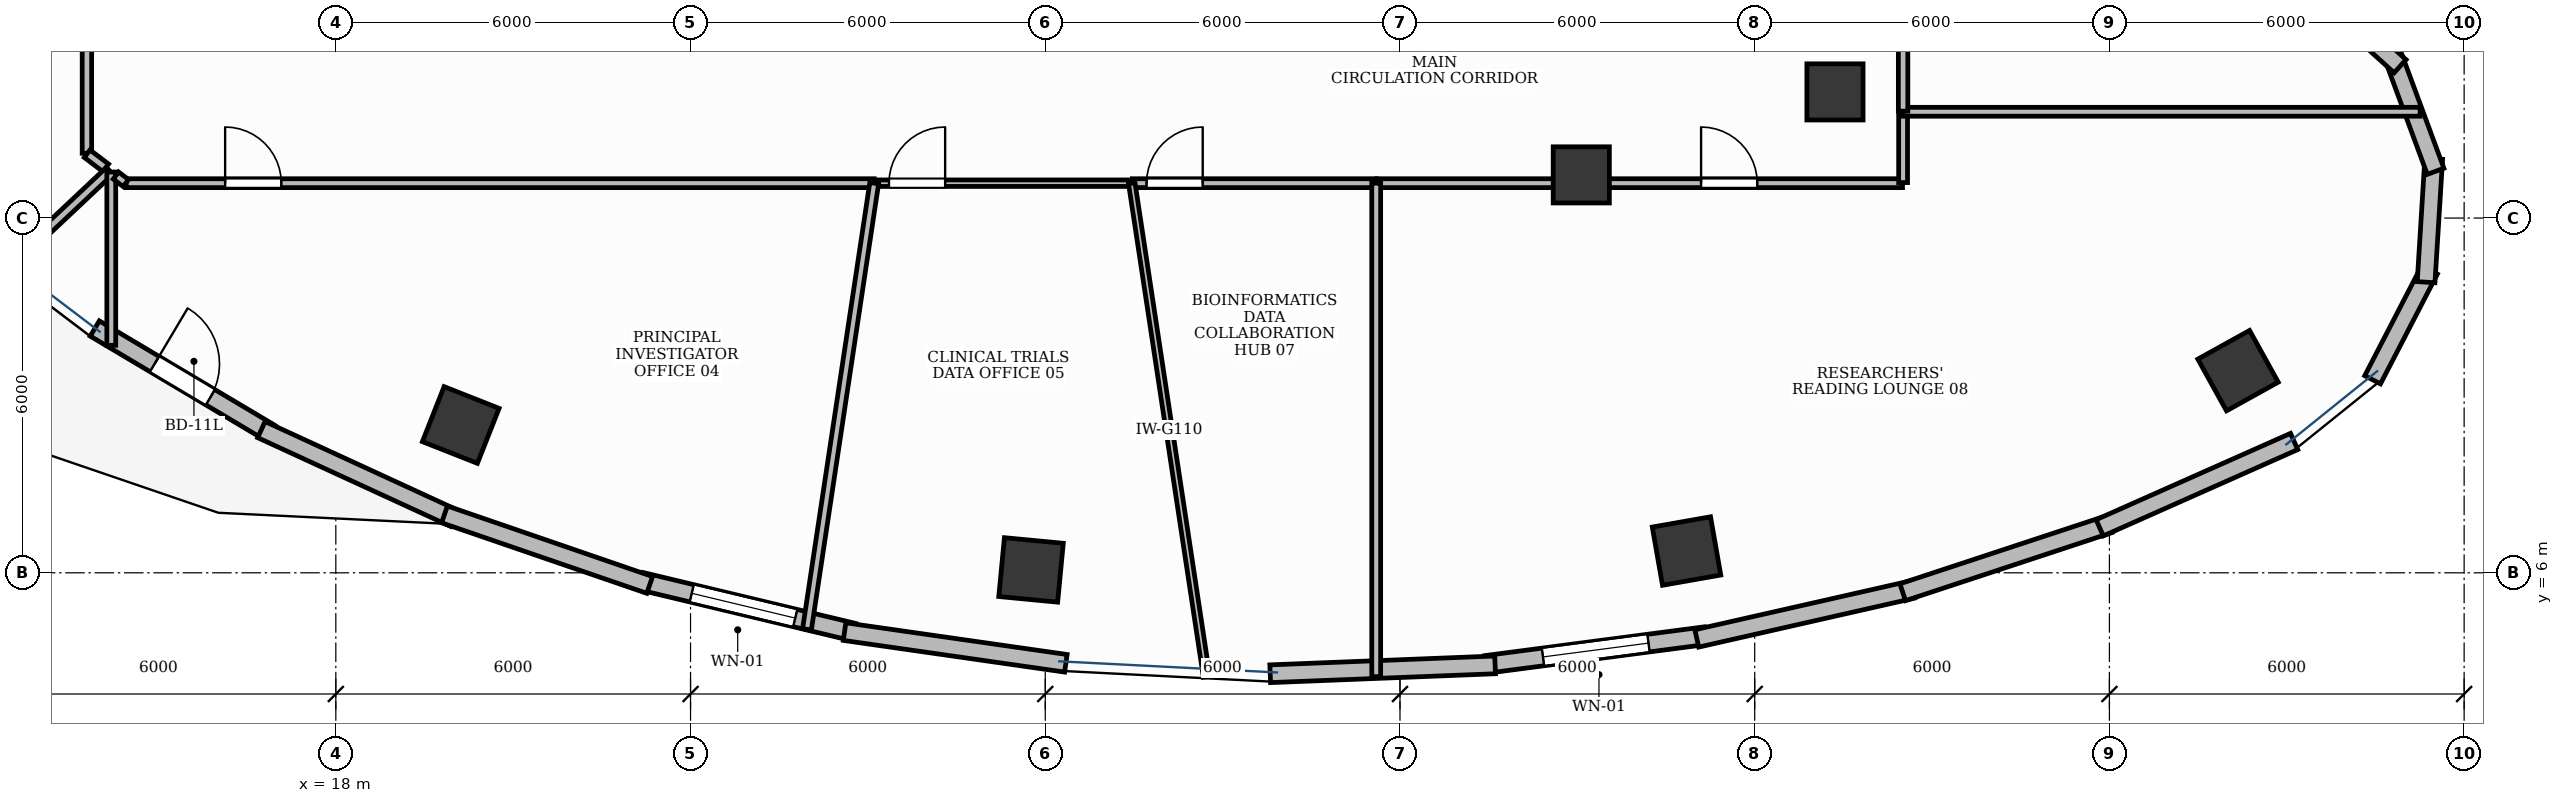
"""IFC4 building model, lengths in metres.
Left out: names, types, materials, properties, quantities, classifications, styles, units other than length and angle.
Written with IfcOpenShell. Run it as: python <this file> out.ifc"""

import sys

from ifc_helpers import new_model, si_unit, direction, frame, frame_2d, origin, origin_2d, place, context, subcontext, project, spatial, rectangle, extrude, element, fill, save


model = new_model("IFC4")
c1 = context("Model", 3, precision=1e-05, world=origin(), true_north=direction((0.0, 1.0)))
c2 = subcontext(c1, "Body", "Model", "MODEL_VIEW")
j1 = project(units=[si_unit("LENGTHUNIT", "METRE"), si_unit("PLANEANGLEUNIT", "RADIAN")], contexts=[c1])
p1 = place(None, origin())
s1 = spatial("IfcSite", under=j1, at=p1, CompositionType="ELEMENT")
p2 = place(p1, origin())
s2 = spatial("IfcBuilding", under=s1, at=p2, CompositionType="ELEMENT")
p3 = place(p2, frame((0.0, 0.0, 239.4)))
s3 = spatial("IfcBuildingStorey", under=s2, at=p3, CompositionType="ELEMENT", Elevation=239.4)
for number, where, z_axis, x_axis in (
    (1, (20.113, 8.5, -0.0), (0.0, 0.0, 1.0), (-0.93, 0.367, 0.0)),
    (2, (29.759, 6.049, -0.0), (0.0, 0.0, 1.0), (-0.995, 0.095, 0.0)),
    (3, (40.847, 6.368, -0.0), (0.0, 0.0, 1.0), (0.985, 0.173, 0.0)),
):
    element("IfcColumn", number, at=place(p3, frame(where, z_axis=z_axis, x_axis=x_axis)), inside=s3, PredefinedType="COLUMN", context=c2, shape_type="SweptSolid", body=[
        extrude(rectangle(XDim=1.0, YDim=1.0, at=origin_2d()), origin(), (0.0, 0.0, 1.0), 3.901),
    ])
p4 = place(p3, frame((39.067, 12.73, -0.0), z_axis=(0.0, 0.0, 1.0), x_axis=(1.0, 0.0, 0.0)))
e4 = element("IfcColumn", 4, at=p4, inside=s3, PredefinedType="COLUMN", context=c2, shape_type="SweptSolid", body=[
    extrude(rectangle(XDim=0.95, YDim=0.95, at=origin_2d()), origin(), (0.0, 0.0, 1.0), 3.901),
])
p5 = place(p3, frame((50.176, 9.419, -0.0), z_axis=(0.0, 0.0, 1.0), x_axis=(0.874535078577, 0.484962262797, 0.0)))
e5 = element("IfcColumn", 5, at=p5, inside=s3, PredefinedType="COLUMN", context=c2, shape_type="SweptSolid", body=[
    extrude(rectangle(XDim=1.0, YDim=1.0, at=origin_2d()), origin(), (0.0, 0.0, 1.0), 3.901),
])
p6 = place(p3, frame((43.358, 14.134, -0.0), z_axis=(0.0, 0.0, 1.0), x_axis=(1.0, 0.0, 0.0)))
e6 = element("IfcColumn", 6, at=p6, inside=s3, PredefinedType="COLUMN", context=c2, shape_type="SweptSolid", body=[
    extrude(rectangle(XDim=0.95, YDim=0.95, at=origin_2d()), origin(), (0.0, 0.0, 1.0), 3.901),
])
p7 = place(p3, frame((13.923, 10.132, 0.0), z_axis=(0.0, 0.0, 1.0), x_axis=(0.859459434124, -0.511203952543, 0.0)))
e7 = element("IfcWall", 7, at=p7, inside=s3, PredefinedType="STANDARD", context=c2, shape_type="SweptSolid", body=[
    extrude(rectangle(XDim=3.45, YDim=0.3, at=frame_2d((1.725, 0.0))), origin(), (0.0, 0.0, 1.0), 3.9),
])
p8 = place(p7, frame((1.175, 0.0, 0.0)))
e8 = element("IfcOpeningElement", 8, at=p8, cuts=e7, PredefinedType="OPENING", context=c2, shape_type="SweptSolid", body=[
    extrude(rectangle(XDim=1.1, YDim=2.15, at=frame_2d((0.55, 1.075))), frame((0.0, 0.165, 0.0), z_axis=(0.0, -1.0, 0.0), x_axis=(1.0, 0.0, 0.0)), (0.0, 0.0, 1.0), 0.33),
])
p9 = place(p3, frame((23.167, 5.858, 0.0), z_axis=(0.0, 0.0, 1.0), x_axis=(0.972474188183, -0.233010629193, 0.0)))
e9 = element("IfcWall", 9, at=p9, inside=s3, PredefinedType="STANDARD", context=c2, shape_type="SweptSolid", body=[
    extrude(rectangle(XDim=3.696, YDim=0.3, at=frame_2d((1.848, 0.0))), origin(), (0.0, 0.0, 1.0), 3.9),
])
p10 = place(p9, frame((0.878, 0.0, 0.9)))
e10 = element("IfcOpeningElement", 10, at=p10, cuts=e9, PredefinedType="OPENING", context=c2, shape_type="SweptSolid", body=[
    extrude(rectangle(XDim=1.8, YDim=2.1, at=frame_2d((0.9, 1.05))), frame((0.0, 0.165, 0.0), z_axis=(0.0, -1.0, 0.0), x_axis=(1.0, 0.0, 0.0)), (0.0, 0.0, 1.0), 0.33),
])
p11 = place(p3, frame((37.454, 4.45, 0.0), z_axis=(0.0, 0.0, 1.0), x_axis=(0.991509668365, 0.130032986352, 0.0)))
e11 = element("IfcWall", 11, at=p11, inside=s3, PredefinedType="STANDARD", context=c2, shape_type="SweptSolid", body=[
    extrude(rectangle(XDim=3.746, YDim=0.3, at=frame_2d((1.873, 0.0))), origin(), (0.0, 0.0, 1.0), 3.9),
])
p12 = place(p11, frame((0.973, 0.0, 0.9)))
e12 = element("IfcOpeningElement", 12, at=p12, cuts=e11, PredefinedType="OPENING", context=c2, shape_type="SweptSolid", body=[
    extrude(rectangle(XDim=1.8, YDim=2.1, at=frame_2d((0.9, 1.05))), frame((0.0, 0.165, 0.0), z_axis=(0.0, -1.0, 0.0), x_axis=(1.0, 0.0, 0.0)), (0.0, 0.0, 1.0), 0.33),
])
p13 = place(p3, frame((16.741, 8.422, 0.0), z_axis=(0.0, 0.0, 1.0), x_axis=(0.908506474671, -0.417870776055, 0.0)))
e13 = element("IfcWall", 13, at=p13, inside=s3, PredefinedType="STANDARD", context=c2, shape_type="SweptSolid", body=[
    extrude(rectangle(XDim=3.587, YDim=0.3, at=frame_2d((1.793, 0.0))), origin(), (0.0, 0.0, 1.0), 3.9),
])
p14 = place(p3, frame((19.838, 6.988, 0.0), z_axis=(0.0, 0.0, 1.0), x_axis=(0.945722383555, -0.32497565023, 0.0)))
e14 = element("IfcWall", 14, at=p14, inside=s3, PredefinedType="STANDARD", context=c2, shape_type="SweptSolid", body=[
    extrude(rectangle(XDim=3.67, YDim=0.3, at=frame_2d((1.835, 0.0))), origin(), (0.0, 0.0, 1.0), 3.9),
])
p15 = place(p3, frame((26.605, 5.005, 0.0), z_axis=(0.0, 0.0, 1.0), x_axis=(0.989897776303, -0.141782906128, 0.0)))
e15 = element("IfcWall", 15, at=p15, inside=s3, PredefinedType="STANDARD", context=c2, shape_type="SweptSolid", body=[
    extrude(rectangle(XDim=3.781, YDim=0.3, at=frame_2d((1.891, 0.0))), origin(), (0.0, 0.0, 1.0), 3.9),
])
p16 = place(p3, frame((33.805, 4.292, 0.0), z_axis=(0.0, 0.0, 1.0), x_axis=(0.999221923177, 0.039440439173, 0.0)))
e16 = element("IfcWall", 16, at=p16, inside=s3, PredefinedType="STANDARD", context=c2, shape_type="SweptSolid", body=[
    extrude(rectangle(XDim=3.807, YDim=0.3, at=frame_2d((1.903, 0.0))), origin(), (0.0, 0.0, 1.0), 3.9),
])
p17 = place(p3, frame((41.021, 4.89, 0.0), z_axis=(0.0, 0.0, 1.0), x_axis=(0.975241674184, 0.221141757557, 0.0)))
e17 = element("IfcWall", 17, at=p17, inside=s3, PredefinedType="STANDARD", context=c2, shape_type="SweptSolid", body=[
    extrude(rectangle(XDim=3.743, YDim=0.3, at=frame_2d((1.871, 0.0))), origin(), (0.0, 0.0, 1.0), 3.9),
])
p18 = place(p3, frame((44.504, 5.671, 0.0), z_axis=(0.0, 0.0, 1.0), x_axis=(0.94972655205, 0.313080622734, 0.0)))
e18 = element("IfcWall", 18, at=p18, inside=s3, PredefinedType="STANDARD", context=c2, shape_type="SweptSolid", body=[
    extrude(rectangle(XDim=3.679, YDim=0.3, at=frame_2d((1.84, 0.0))), origin(), (0.0, 0.0, 1.0), 3.9),
])
p19 = place(p3, frame((47.836, 6.761, 0.0), z_axis=(0.0, 0.0, 1.0), x_axis=(0.913940198441, 0.405848880341, 0.0)))
e19 = element("IfcWall", 19, at=p19, inside=s3, PredefinedType="STANDARD", context=c2, shape_type="SweptSolid", body=[
    extrude(rectangle(XDim=3.598, YDim=0.3, at=frame_2d((1.799, 0.0))), origin(), (0.0, 0.0, 1.0), 3.9),
])
p20 = place(p3, frame((52.452, 9.265, 0.0), z_axis=(0.0, 0.0, 1.0), x_axis=(0.459683297138, 0.888082916361, 0.0)))
e20 = element("IfcWall", 20, at=p20, inside=s3, PredefinedType="STANDARD", context=c2, shape_type="SweptSolid", body=[
    extrude(rectangle(XDim=2.092, YDim=0.3, at=frame_2d((1.046, 0.0))), origin(), (0.0, 0.0, 1.0), 3.9),
])
for number, where, z_axis, x_axis in (
    (21, (53.356, 10.915, 0.0), (0.0, 0.0, 1.0), (0.062, 0.998, 0.0)),
    (22, (53.517, 12.791, 0.0), (0.0, 0.0, 1.0), (-0.346, 0.938, 0.0)),
):
    element("IfcWall", number, at=place(p3, frame(where, z_axis=z_axis, x_axis=x_axis)), inside=s3, PredefinedType="STANDARD", context=c2, shape_type="SweptSolid", body=[
        extrude(rectangle(XDim=2.091, YDim=0.3, at=frame_2d((1.046, 0.0))), origin(), (0.0, 0.0, 1.0), 3.9),
    ])
p21 = place(p3, frame((52.917, 14.569, 0.0), z_axis=(0.0, 0.0, 1.0), x_axis=(-0.742037796493, 0.670358045059, 0.0)))
e23 = element("IfcWall", 23, at=p21, inside=s3, PredefinedType="STANDARD", context=c2, shape_type="SweptSolid", body=[
    extrude(rectangle(XDim=3.685, YDim=0.3, at=frame_2d((1.843, 0.0))), origin(), (0.0, 0.0, 1.0), 3.9),
])
p22 = place(p3, frame((13.79, 23.884, 0.0), z_axis=(0.0, 0.0, 1.0), x_axis=(0.0, -1.0, 0.0)))
e24 = element("IfcWall", 24, at=p22, inside=s3, PredefinedType="PARTITIONING", context=c2, shape_type="SweptSolid", body=[
    extrude(rectangle(XDim=10.787, YDim=0.16, at=frame_2d((5.394, 0.0))), origin(), (0.0, 0.0, 1.0), 2.22),
])
p23 = place(p22, frame((0.24, 0.0, 0.0)))
e25 = element("IfcOpeningElement", 25, at=p23, cuts=e24, PredefinedType="OPENING", context=c2, shape_type="SweptSolid", body=[
    extrude(rectangle(XDim=0.95, YDim=2.15, at=frame_2d((0.475, 1.075))), frame((0.0, 0.095, 0.0), z_axis=(0.0, -1.0, 0.0), x_axis=(1.0, 0.0, 0.0)), (0.0, 0.0, 1.0), 0.19),
])
p24 = place(p3, frame((14.454, 12.59, 0.0), z_axis=(0.0, 0.0, 1.0), x_axis=(1.0, 0.0, 0.0)))
e26 = element("IfcWall", 26, at=p24, inside=s3, PredefinedType="PARTITIONING", context=c2, shape_type="SweptSolid", body=[
    extrude(rectangle(XDim=12.652, YDim=0.15, at=frame_2d((6.326, 0.0))), origin(), (0.0, 0.0, 1.0), 2.22),
])
p25 = place(p24, frame((1.673, 0.0, 0.0)))
e27 = element("IfcOpeningElement", 27, at=p25, cuts=e26, PredefinedType="OPENING", context=c2, shape_type="SweptSolid", body=[
    extrude(rectangle(XDim=0.95, YDim=2.15, at=frame_2d((0.475, 1.075))), frame((0.0, 0.09, 0.0), z_axis=(0.0, -1.0, 0.0), x_axis=(1.0, 0.0, 0.0)), (0.0, 0.0, 1.0), 0.18),
])
p26 = place(p3, frame((27.117, 12.59, 0.0), z_axis=(0.0, 0.0, 1.0), x_axis=(1.0, 0.0, 0.0)))
e28 = element("IfcWall", 28, at=p26, inside=s3, PredefinedType="MOVABLE", context=c2, shape_type="SweptSolid", body=[
    extrude(rectangle(XDim=4.347, YDim=0.11, at=frame_2d((2.173, 0.0))), origin(), (0.0, 0.0, 1.0), 2.22),
])
p27 = place(p26, frame((0.24, 0.0, 0.0)))
e29 = element("IfcOpeningElement", 29, at=p27, cuts=e28, PredefinedType="OPENING", context=c2, shape_type="SweptSolid", body=[
    extrude(rectangle(XDim=0.95, YDim=2.15, at=frame_2d((0.475, 1.075))), frame((0.0, 0.07, 0.0), z_axis=(0.0, -1.0, 0.0), x_axis=(1.0, 0.0, 0.0)), (0.0, 0.0, 1.0), 0.14),
])
p28 = place(p3, frame((31.473, 12.59, 0.0), z_axis=(0.0, 0.0, 1.0), x_axis=(1.0, 0.0, 0.0)))
e30 = element("IfcWall", 30, at=p28, inside=s3, PredefinedType="PARTITIONING", context=c2, shape_type="SweptSolid", body=[
    extrude(rectangle(XDim=4.125, YDim=0.15, at=frame_2d((2.062, 0.0))), origin(), (0.0, 0.0, 1.0), 2.22),
])
p29 = place(p28, frame((0.24, 0.0, 0.0)))
e31 = element("IfcOpeningElement", 31, at=p29, cuts=e30, PredefinedType="OPENING", context=c2, shape_type="SweptSolid", body=[
    extrude(rectangle(XDim=0.95, YDim=2.15, at=frame_2d((0.475, 1.075))), frame((0.0, 0.09, 0.0), z_axis=(0.0, -1.0, 0.0), x_axis=(1.0, 0.0, 0.0)), (0.0, 0.0, 1.0), 0.18),
])
p30 = place(p3, frame((35.608, 12.59, 0.0), z_axis=(0.0, 0.0, 1.0), x_axis=(1.0, 0.0, 0.0)))
e32 = element("IfcWall", 32, at=p30, inside=s3, PredefinedType="PARTITIONING", context=c2, shape_type="SweptSolid", body=[
    extrude(rectangle(XDim=8.892, YDim=0.15, at=frame_2d((4.446, 0.0))), origin(), (0.0, 0.0, 1.0), 2.22),
])
p31 = place(p30, frame((5.485, 0.0, 0.0)))
e33 = element("IfcOpeningElement", 33, at=p31, cuts=e32, PredefinedType="OPENING", context=c2, shape_type="SweptSolid", body=[
    extrude(rectangle(XDim=0.95, YDim=2.15, at=frame_2d((0.475, 1.075))), frame((0.0, 0.09, 0.0), z_axis=(0.0, -1.0, 0.0), x_axis=(1.0, 0.0, 0.0)), (0.0, 0.0, 1.0), 0.18),
])
p32 = place(p3, frame((13.794, 13.088, 0.0), z_axis=(0.0, 0.0, 1.0), x_axis=(0.797092148154, -0.603857687995, 0.0)))
e34 = element("IfcWall", 34, at=p32, inside=s3, PredefinedType="PARTITIONING", context=c2, shape_type="SweptSolid", body=[
    extrude(rectangle(XDim=0.394, YDim=0.16, at=frame_2d((0.197, 0.0))), origin(), (0.0, 0.0, 1.0), 2.22),
])
p33 = place(p3, frame((14.175, 12.799, 0.0), z_axis=(0.0, 0.0, 1.0), x_axis=(-0.728528819482, -0.685015152521, 0.0)))
e35 = element("IfcWall", 35, at=p33, inside=s3, PredefinedType="PARTITIONING", context=c2, shape_type="SweptSolid", body=[
    extrude(rectangle(XDim=2.441, YDim=0.16, at=frame_2d((1.22, 0.0))), origin(), (0.0, 0.0, 1.0), 2.22),
])
p34 = place(p3, frame((14.202, 9.847, 0.0), z_axis=(0.0, 0.0, 1.0), x_axis=(0.0, 1.0, 0.0)))
e36 = element("IfcWall", 36, at=p34, inside=s3, PredefinedType="PARTITIONING", context=c2, shape_type="SweptSolid", body=[
    extrude(rectangle(XDim=2.931, YDim=0.15, at=frame_2d((1.466, 0.0))), origin(), (0.0, 0.0, 1.0), 2.22),
])
p35 = place(p3, frame((14.28, 12.72, 0.0), z_axis=(0.0, 0.0, 1.0), x_axis=(0.796940505815, -0.604057803683, 0.0)))
e37 = element("IfcWall", 37, at=p35, inside=s3, PredefinedType="PARTITIONING", context=c2, shape_type="SweptSolid", body=[
    extrude(rectangle(XDim=0.211, YDim=0.15, at=frame_2d((0.106, 0.0))), origin(), (0.0, 0.0, 1.0), 2.22),
])
p36 = place(p3, frame((27.107, 12.59, 0.0), z_axis=(0.0, 0.0, 1.0), x_axis=(-0.149013085528, -0.98883522406, 0.0)))
e38 = element("IfcWall", 38, at=p36, inside=s3, PredefinedType="PARTITIONING", context=c2, shape_type="SweptSolid", body=[
    extrude(rectangle(XDim=7.632, YDim=0.15, at=frame_2d((3.816, 0.0))), origin(), (0.0, 0.0, 1.0), 2.22),
])
p37 = place(p3, frame((31.463, 12.59, 0.0), z_axis=(0.0, 0.0, 1.0), x_axis=(0.149927844007, -0.988696941227, 0.0)))
e39 = element("IfcWall", 39, at=p37, inside=s3, PredefinedType="MOVABLE", context=c2, shape_type="SweptSolid", body=[
    extrude(rectangle(XDim=8.445, YDim=0.11, at=frame_2d((4.222, 0.0))), origin(), (0.0, 0.0, 1.0), 2.22),
])
p38 = place(p3, frame((35.598, 12.59, 0.0), z_axis=(0.0, 0.0, 1.0), x_axis=(0.0, -1.0, 0.0)))
e40 = element("IfcWall", 40, at=p38, inside=s3, PredefinedType="PARTITIONING", context=c2, shape_type="SweptSolid", body=[
    extrude(rectangle(XDim=8.347, YDim=0.15, at=frame_2d((4.173, 0.0))), origin(), (0.0, 0.0, 1.0), 2.22),
])
p39 = place(p3, frame((44.51, 12.6, 0.0), z_axis=(0.0, 0.0, 1.0), x_axis=(0.0, 1.0, 0.0)))
e41 = element("IfcWall", 41, at=p39, inside=s3, PredefinedType="PARTITIONING", context=c2, shape_type="SweptSolid", body=[
    extrude(rectangle(XDim=1.198, YDim=0.15, at=frame_2d((0.599, 0.0))), origin(), (0.0, 0.0, 1.0), 2.22),
])
p40 = place(p3, frame((44.51, 13.798, 0.0), z_axis=(0.0, 0.0, 1.0), x_axis=(1.0, 0.0, 0.0)))
e42 = element("IfcWall", 42, at=p40, inside=s3, PredefinedType="PARTITIONING", context=c2, shape_type="SweptSolid", body=[
    extrude(rectangle(XDim=8.745, YDim=0.15, at=frame_2d((4.373, 0.0))), origin(), (0.0, 0.0, 1.0), 2.22),
])
p41 = place(p3, frame((44.51, 13.808, 0.0), z_axis=(0.0, 0.0, 1.0), x_axis=(0.0, 1.0, 0.0)))
e43 = element("IfcWall", 43, at=p41, inside=s3, PredefinedType="PARTITIONING", context=c2, shape_type="SweptSolid", body=[
    extrude(rectangle(XDim=2.592, YDim=0.16, at=frame_2d((1.296, 0.0))), origin(), (0.0, 0.0, 1.0), 2.22),
])
p42 = place(p8, origin())
e44 = element("IfcDoor", 44, at=p42, inside=s3, OperationType="SINGLE_SWING_LEFT", PredefinedType="DOOR", context=c2, shape_type="SweptSolid", body=[
    extrude(rectangle(XDim=1.1, YDim=2.15, at=frame_2d((0.55, 1.075))), frame((0.0, 0.025, 0.0), z_axis=(0.0, -1.0, 0.0), x_axis=(1.0, 0.0, 0.0)), (0.0, 0.0, 1.0), 0.05),
])
fill(e8, e44)
p43 = place(p10, origin())
e45 = element("IfcWindow", 45, at=p43, inside=s3, PartitioningType="SINGLE_PANEL", PredefinedType="WINDOW", context=c2, shape_type="SweptSolid", body=[
    extrude(rectangle(XDim=1.8, YDim=2.1, at=frame_2d((0.9, 1.05))), frame((0.0, 0.03, 0.0), z_axis=(0.0, -1.0, 0.0), x_axis=(1.0, 0.0, 0.0)), (0.0, 0.0, 1.0), 0.06),
])
fill(e10, e45)
p44 = place(p12, origin())
e46 = element("IfcWindow", 46, at=p44, inside=s3, PartitioningType="SINGLE_PANEL", PredefinedType="WINDOW", context=c2, shape_type="SweptSolid", body=[
    extrude(rectangle(XDim=1.8, YDim=2.1, at=frame_2d((0.9, 1.05))), frame((0.0, 0.03, 0.0), z_axis=(0.0, -1.0, 0.0), x_axis=(1.0, 0.0, 0.0)), (0.0, 0.0, 1.0), 0.06),
])
fill(e12, e46)
p45 = place(p25, origin())
e47 = element("IfcDoor", 47, at=p45, inside=s3, OperationType="SINGLE_SWING_LEFT", PredefinedType="DOOR", context=c2, shape_type="SweptSolid", body=[
    extrude(rectangle(XDim=0.95, YDim=2.15, at=frame_2d((0.475, 1.075))), frame((0.0, 0.025, 0.0), z_axis=(0.0, -1.0, 0.0), x_axis=(1.0, 0.0, 0.0)), (0.0, 0.0, 1.0), 0.05),
])
fill(e27, e47)
p46 = place(p27, origin())
e48 = element("IfcDoor", 48, at=p46, inside=s3, OperationType="SINGLE_SWING_RIGHT", PredefinedType="DOOR", context=c2, shape_type="SweptSolid", body=[
    extrude(rectangle(XDim=0.95, YDim=2.15, at=frame_2d((0.475, 1.075))), frame((0.0, 0.025, 0.0), z_axis=(0.0, -1.0, 0.0), x_axis=(1.0, 0.0, 0.0)), (0.0, 0.0, 1.0), 0.05),
])
fill(e29, e48)
p47 = place(p29, origin())
e49 = element("IfcDoor", 49, at=p47, inside=s3, OperationType="SINGLE_SWING_RIGHT", PredefinedType="DOOR", context=c2, shape_type="SweptSolid", body=[
    extrude(rectangle(XDim=0.95, YDim=2.15, at=frame_2d((0.475, 1.075))), frame((0.0, 0.025, 0.0), z_axis=(0.0, -1.0, 0.0), x_axis=(1.0, 0.0, 0.0)), (0.0, 0.0, 1.0), 0.05),
])
fill(e31, e49)
p48 = place(p31, origin())
e50 = element("IfcDoor", 50, at=p48, inside=s3, OperationType="SINGLE_SWING_LEFT", PredefinedType="DOOR", context=c2, shape_type="SweptSolid", body=[
    extrude(rectangle(XDim=0.95, YDim=2.15, at=frame_2d((0.475, 1.075))), frame((0.0, 0.025, 0.0), z_axis=(0.0, -1.0, 0.0), x_axis=(1.0, 0.0, 0.0)), (0.0, 0.0, 1.0), 0.05),
])
fill(e33, e50)
save(model, sys.argv[1])
